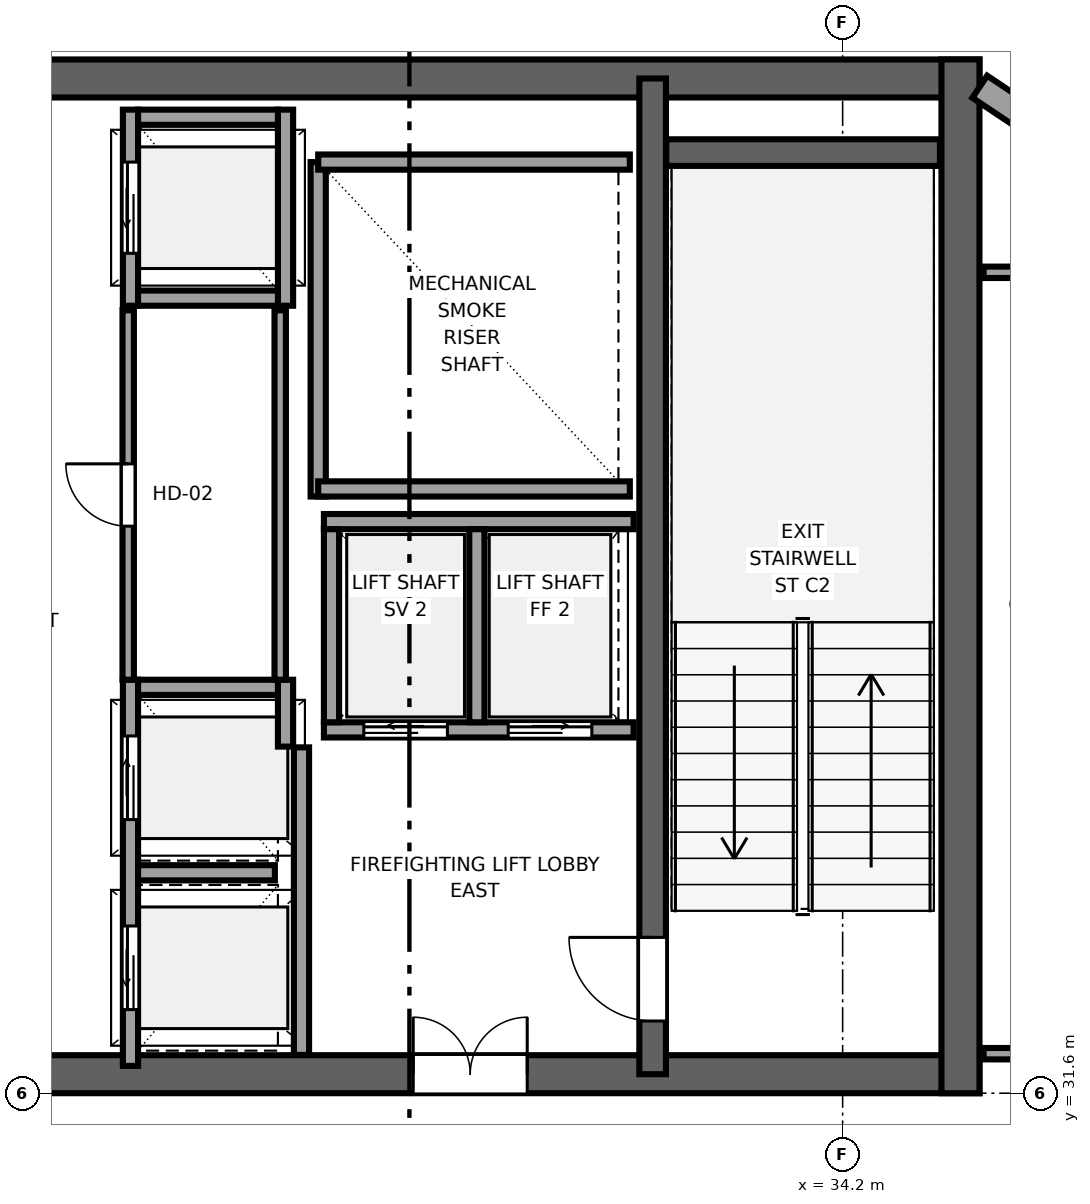
"""IFC4 building model, lengths in metres.
Left out: names, types, materials, properties, quantities, classifications, styles, units other than length and angle.
Written with IfcOpenShell. Run it as: python <this file> out.ifc"""

import sys

from ifc_helpers import new_model, si_unit, direction, frame, frame_2d, origin, place, context, subcontext, project, spatial, rectangle, extrude, source, transform, mapped, element, fill, save


model = new_model("IFC4")
c1 = context("Model", 3, precision=1e-05, world=origin(), true_north=direction((0.0, 1.0)))
c2 = subcontext(c1, "Body", "Model", "MODEL_VIEW")
j1 = project(units=[si_unit("LENGTHUNIT", "METRE"), si_unit("PLANEANGLEUNIT", "RADIAN")], contexts=[c1])
p1 = place(None, origin())
s1 = spatial("IfcSite", under=j1, at=p1, CompositionType="ELEMENT")
p2 = place(p1, origin())
s2 = spatial("IfcBuilding", under=s1, at=p2, CompositionType="ELEMENT")
p3 = place(p2, frame((0.0, 0.0, 282.15)))
s3 = spatial("IfcBuildingStorey", under=s2, at=p3, CompositionType="ELEMENT", Elevation=282.15)
p4 = place(p3, frame((10.0, 31.85, 0.0), z_axis=(0.0, 0.0, 1.0), x_axis=(1.0, 0.0, 0.0)))
e1 = element("IfcWall", 1, at=p4, inside=s3, PredefinedType="SHEAR", context=c2, shape_type="SweptSolid", body=[
    extrude(rectangle(XDim=26.0, YDim=0.5, at=frame_2d((13.0, 0.0))), origin(), (0.0, 0.0, 1.0), 4.4),
])
p5 = place(p4, frame((7.45, 0.0, 0.0), z_axis=(0.0, 0.0, 1.0), x_axis=(-1.0, 0.0, 0.0)))
e2 = element("IfcOpeningElement", 2, at=p5, cuts=e1, PredefinedType="OPENING", context=c2, shape_type="SweptSolid", body=[
    extrude(rectangle(XDim=1.5, YDim=2.04, at=frame_2d((0.75, 1.02))), frame((0.0, 0.26, 0.0), z_axis=(0.0, -1.0, 0.0), x_axis=(1.0, 0.0, 0.0)), (0.0, 0.0, 1.0), 0.52),
])
p6 = place(p4, frame((13.75, 0.0, 0.0), z_axis=(0.0, 0.0, 1.0), x_axis=(-1.0, 0.0, 0.0)))
e3 = element("IfcOpeningElement", 3, at=p6, cuts=e1, PredefinedType="OPENING", context=c2, shape_type="SweptSolid", body=[
    extrude(rectangle(XDim=1.5, YDim=2.04, at=frame_2d((0.75, 1.02))), frame((0.0, 0.26, 0.0), z_axis=(0.0, -1.0, 0.0), x_axis=(1.0, 0.0, 0.0)), (0.0, 0.0, 1.0), 0.52),
])
p7 = place(p4, frame((20.05, 0.0, 0.0), z_axis=(0.0, 0.0, 1.0), x_axis=(-1.0, 0.0, 0.0)))
e4 = element("IfcOpeningElement", 4, at=p7, cuts=e1, PredefinedType="OPENING", context=c2, shape_type="SweptSolid", body=[
    extrude(rectangle(XDim=1.5, YDim=2.04, at=frame_2d((0.75, 1.02))), frame((0.0, 0.26, 0.0), z_axis=(0.0, -1.0, 0.0), x_axis=(1.0, 0.0, 0.0)), (0.0, 0.0, 1.0), 0.52),
])
p8 = place(p3, frame((10.0, 44.95, 0.0), z_axis=(0.0, 0.0, 1.0), x_axis=(1.0, 0.0, 0.0)))
e5 = element("IfcWall", 5, at=p8, inside=s3, PredefinedType="SHEAR", context=c2, shape_type="SweptSolid", body=[
    extrude(rectangle(XDim=26.0, YDim=0.5, at=frame_2d((13.0, 0.0))), origin(), (0.0, 0.0, 1.0), 4.4),
])
p9 = place(p3, frame((35.75, 31.6, 0.0), z_axis=(0.0, 0.0, 1.0), x_axis=(0.0, 1.0, 0.0)))
e6 = element("IfcWall", 6, at=p9, inside=s3, PredefinedType="SHEAR", context=c2, shape_type="SweptSolid", body=[
    extrude(rectangle(XDim=13.6, YDim=0.5, at=frame_2d((6.8, 0.0))), origin(), (0.0, 0.0, 1.0), 4.4),
])
p10 = place(p3, frame((31.7, 31.85, 0.0), z_axis=(0.0, 0.0, 1.0), x_axis=(0.0, 1.0, 0.0)))
e7 = element("IfcWall", 7, at=p10, inside=s3, PredefinedType="SHEAR", context=c2, shape_type="SweptSolid", body=[
    extrude(rectangle(XDim=13.1, YDim=0.35, at=frame_2d((6.55, 0.0))), origin(), (0.0, 0.0, 1.0), 4.4),
])
p11 = place(p10, frame((1.8, 0.0, 0.0), z_axis=(0.0, 0.0, 1.0), x_axis=(-1.0, 0.0, 0.0)))
e8 = element("IfcOpeningElement", 8, at=p11, cuts=e7, PredefinedType="OPENING", context=c2, shape_type="SweptSolid", body=[
    extrude(rectangle(XDim=1.1, YDim=2.12, at=frame_2d((0.55, 1.06))), frame((0.0, 0.185, 0.0), z_axis=(0.0, -1.0, 0.0), x_axis=(1.0, 0.0, 0.0)), (0.0, 0.0, 1.0), 0.37),
])
p12 = place(p3, frame((31.88, 43.975, 0.0), z_axis=(0.0, 0.0, 1.0), x_axis=(1.0, 0.0, 0.0)))
e9 = element("IfcWall", 9, at=p12, inside=s3, PredefinedType="SHEAR", context=c2, shape_type="SweptSolid", body=[
    extrude(rectangle(XDim=3.6, YDim=0.35, at=frame_2d((1.8, 0.0))), origin(), (0.0, 0.0, 1.0), 4.4),
])
p13 = place(p3, frame((37.585, 43.785, 0.0), z_axis=(0.0, 0.0, 1.0), x_axis=(-0.831516639465, 0.555499845448, 0.0)))
e10 = element("IfcWall", 10, at=p13, inside=s3, PredefinedType="SOLIDWALL", context=c2, shape_type="SweptSolid", body=[
    extrude(rectangle(XDim=1.902, YDim=0.35, at=frame_2d((0.951, 0.0))), origin(), (0.0, 0.0, 1.0), 4.18),
])
p14 = place(p3, frame((27.3, 39.45, 0.0), z_axis=(0.0, 0.0, 1.0), x_axis=(0.0, 1.0, 0.0)))
e11 = element("IfcWall", 11, at=p14, inside=s3, PredefinedType="SOLIDWALL", context=c2, shape_type="SweptSolid", body=[
    extrude(rectangle(XDim=4.4, YDim=0.2, at=frame_2d((2.2, 0.0))), origin(), (0.0, 0.0, 1.0), 4.18),
])
for number, where, z_axis, x_axis in (
    (12, (27.3, 39.55, 0.0), (0.0, 0.0, 1.0), (1.0, 0.0, 0.0)),
    (13, (27.3, 43.85, 0.0), (0.0, 0.0, 1.0), (1.0, 0.0, 0.0)),
):
    element("IfcWall", number, at=place(p3, frame(where, z_axis=z_axis, x_axis=x_axis)), inside=s3, PredefinedType="SOLIDWALL", context=c2, shape_type="SweptSolid", body=[
        extrude(rectangle(XDim=4.1, YDim=0.2, at=frame_2d((2.05, 0.0))), origin(), (0.0, 0.0, 1.0), 4.18),
    ])
p15 = place(p3, frame((27.08, 32.104, 0.0), z_axis=(0.0, 0.0, 1.0), x_axis=(0.0, 1.0, 0.0)))
e14 = element("IfcWall", 14, at=p15, inside=s3, PredefinedType="SOLIDWALL", context=c2, shape_type="SweptSolid", body=[
    extrude(rectangle(XDim=4.046, YDim=0.2, at=frame_2d((2.023, 0.0))), origin(), (0.0, 0.0, 1.0), 4.18),
])
p16 = place(p3, frame((27.375, 36.38, 0.0), z_axis=(0.0, 0.0, 1.0), x_axis=(1.0, 0.0, 0.0)))
e15 = element("IfcWall", 15, at=p16, inside=s3, PredefinedType="SOLIDWALL", context=c2, shape_type="SweptSolid", body=[
    extrude(rectangle(XDim=4.075, YDim=0.2, at=frame_2d((2.038, 0.0))), origin(), (0.0, 0.0, 1.0), 4.18),
])
p17 = place(p16, frame((0.525, 0.0, 0.0)))
e16 = element("IfcOpeningElement", 16, at=p17, cuts=e15, PredefinedType="OPENING", context=c2, shape_type="SweptSolid", body=[
    extrude(rectangle(XDim=1.1, YDim=2.12, at=frame_2d((0.55, 1.06))), frame((0.0, 0.11, 0.0), z_axis=(0.0, -1.0, 0.0), x_axis=(1.0, 0.0, 0.0)), (0.0, 0.0, 1.0), 0.22),
])
p18 = place(p16, frame((2.425, 0.0, 0.0)))
e17 = element("IfcOpeningElement", 17, at=p18, cuts=e15, PredefinedType="OPENING", context=c2, shape_type="SweptSolid", body=[
    extrude(rectangle(XDim=1.1, YDim=2.12, at=frame_2d((0.55, 1.06))), frame((0.0, 0.11, 0.0), z_axis=(0.0, -1.0, 0.0), x_axis=(1.0, 0.0, 0.0)), (0.0, 0.0, 1.0), 0.22),
])
p19 = place(p3, frame((27.375, 39.12, 0.0), z_axis=(0.0, 0.0, 1.0), x_axis=(1.0, 0.0, 0.0)))
e18 = element("IfcWall", 18, at=p19, inside=s3, PredefinedType="SOLIDWALL", context=c2, shape_type="SweptSolid", body=[
    extrude(rectangle(XDim=4.075, YDim=0.2, at=frame_2d((2.038, 0.0))), origin(), (0.0, 0.0, 1.0), 4.18),
])
for number, where, z_axis, x_axis in (
    (19, (27.475, 36.48, 0.0), (0.0, 0.0, 1.0), (0.0, 1.0, 0.0)),
    (20, (29.387, 36.48, 0.0), (0.0, 0.0, 1.0), (0.0, 1.0, 0.0)),
):
    element("IfcWall", number, at=place(p3, frame(where, z_axis=z_axis, x_axis=x_axis)), inside=s3, PredefinedType="SOLIDWALL", context=c2, shape_type="SweptSolid", body=[
        extrude(rectangle(XDim=2.54, YDim=0.2, at=frame_2d((1.27, 0.0))), origin(), (0.0, 0.0, 1.0), 4.18),
    ])
p20 = place(p3, frame((24.83, 31.96, 0.0), z_axis=(0.0, 0.0, 1.0), x_axis=(0.0, 1.0, 0.0)))
e21 = element("IfcWall", 21, at=p20, inside=s3, PredefinedType="SOLIDWALL", context=c2, shape_type="SweptSolid", body=[
    extrude(rectangle(XDim=5.08, YDim=0.2, at=frame_2d((2.54, 0.0))), origin(), (0.0, 0.0, 1.0), 4.18),
])
p21 = place(p20, frame((0.74, 0.0, 0.0)))
e22 = element("IfcOpeningElement", 22, at=p21, cuts=e21, PredefinedType="OPENING", context=c2, shape_type="SweptSolid", body=[
    extrude(rectangle(XDim=1.1, YDim=2.12, at=frame_2d((0.55, 1.06))), frame((0.0, 0.11, 0.0), z_axis=(0.0, -1.0, 0.0), x_axis=(1.0, 0.0, 0.0)), (0.0, 0.0, 1.0), 0.22),
])
p22 = place(p20, frame((3.24, 0.0, 0.0)))
e23 = element("IfcOpeningElement", 23, at=p22, cuts=e21, PredefinedType="OPENING", context=c2, shape_type="SweptSolid", body=[
    extrude(rectangle(XDim=1.1, YDim=2.12, at=frame_2d((0.55, 1.06))), frame((0.0, 0.11, 0.0), z_axis=(0.0, -1.0, 0.0), x_axis=(1.0, 0.0, 0.0)), (0.0, 0.0, 1.0), 0.22),
])
p23 = place(p3, frame((26.87, 36.16, 0.0), z_axis=(0.0, 0.0, 1.0), x_axis=(0.0, 1.0, 0.0)))
e24 = element("IfcWall", 24, at=p23, inside=s3, PredefinedType="SOLIDWALL", context=c2, shape_type="SweptSolid", body=[
    extrude(rectangle(XDim=0.88, YDim=0.2, at=frame_2d((0.44, 0.0))), origin(), (0.0, 0.0, 1.0), 4.18),
])
p24 = place(p3, frame((24.93, 36.94, 0.0), z_axis=(0.0, 0.0, 1.0), x_axis=(1.0, 0.0, 0.0)))
e25 = element("IfcWall", 25, at=p24, inside=s3, PredefinedType="SOLIDWALL", context=c2, shape_type="SweptSolid", body=[
    extrude(rectangle(XDim=1.84, YDim=0.2, at=frame_2d((0.92, 0.0))), origin(), (0.0, 0.0, 1.0), 4.18),
])
p25 = place(p3, frame((24.93, 34.5, 0.0), z_axis=(0.0, 0.0, 1.0), x_axis=(1.0, 0.0, 0.0)))
e26 = element("IfcWall", 26, at=p25, inside=s3, PredefinedType="SOLIDWALL", context=c2, shape_type="SweptSolid", body=[
    extrude(rectangle(XDim=1.8, YDim=0.2, at=frame_2d((0.9, 0.0))), origin(), (0.0, 0.0, 1.0), 4.18),
])
p26 = place(p3, frame((24.83, 41.96, 0.0), z_axis=(0.0, 0.0, 1.0), x_axis=(0.0, 1.0, 0.0)))
e27 = element("IfcWall", 27, at=p26, inside=s3, PredefinedType="SOLIDWALL", context=c2, shape_type="SweptSolid", body=[
    extrude(rectangle(XDim=2.58, YDim=0.2, at=frame_2d((1.29, 0.0))), origin(), (0.0, 0.0, 1.0), 4.18),
])
p27 = place(p26, frame((0.69, 0.0, 0.0)))
e28 = element("IfcOpeningElement", 28, at=p27, cuts=e27, PredefinedType="OPENING", context=c2, shape_type="SweptSolid", body=[
    extrude(rectangle(XDim=1.2, YDim=2.15, at=frame_2d((0.6, 1.075))), frame((0.0, 0.11, 0.0), z_axis=(0.0, -1.0, 0.0), x_axis=(1.0, 0.0, 0.0)), (0.0, 0.0, 1.0), 0.22),
])
p28 = place(p3, frame((26.87, 41.96, 0.0), z_axis=(0.0, 0.0, 1.0), x_axis=(0.0, 1.0, 0.0)))
e29 = element("IfcWall", 29, at=p28, inside=s3, PredefinedType="SOLIDWALL", context=c2, shape_type="SweptSolid", body=[
    extrude(rectangle(XDim=2.58, YDim=0.2, at=frame_2d((1.29, 0.0))), origin(), (0.0, 0.0, 1.0), 4.18),
])
for number, where, z_axis, x_axis in (
    (30, (24.93, 42.06, 0.0), (0.0, 0.0, 1.0), (1.0, 0.0, 0.0)),
    (31, (24.93, 44.44, 0.0), (0.0, 0.0, 1.0), (1.0, 0.0, 0.0)),
):
    element("IfcWall", number, at=place(p3, frame(where, z_axis=z_axis, x_axis=x_axis)), inside=s3, PredefinedType="SOLIDWALL", context=c2, shape_type="SweptSolid", body=[
        extrude(rectangle(XDim=1.84, YDim=0.2, at=frame_2d((0.92, 0.0))), origin(), (0.0, 0.0, 1.0), 4.18),
    ])
p29 = place(p3, frame((24.8, 37.04, 0.0), z_axis=(0.0, 0.0, 1.0), x_axis=(0.0, 1.0, 0.0)))
e32 = element("IfcWall", 32, at=p29, inside=s3, PredefinedType="PARTITIONING", context=c2, shape_type="SweptSolid", body=[
    extrude(rectangle(XDim=4.86, YDim=0.15, at=frame_2d((2.43, 0.0))), origin(), (0.0, 0.0, 1.0), 4.18),
])
p30 = place(p29, frame((2.02, 0.0, 0.0)))
e33 = element("IfcOpeningElement", 33, at=p30, cuts=e32, PredefinedType="OPENING", context=c2, shape_type="SweptSolid", body=[
    extrude(rectangle(XDim=0.82, YDim=2.01, at=frame_2d((0.41, 1.005))), frame((0.0, 0.085, 0.0), z_axis=(0.0, -1.0, 0.0), x_axis=(1.0, 0.0, 0.0)), (0.0, 0.0, 1.0), 0.17),
])
p31 = place(p3, frame((26.8, 37.04, 0.0), z_axis=(0.0, 0.0, 1.0), x_axis=(0.0, 1.0, 0.0)))
e34 = element("IfcWall", 34, at=p31, inside=s3, PredefinedType="PARTITIONING", context=c2, shape_type="SweptSolid", body=[
    extrude(rectangle(XDim=4.86, YDim=0.15, at=frame_2d((2.43, 0.0))), origin(), (0.0, 0.0, 1.0), 4.18),
])
p32 = place(p3, frame((36.055, 32.12, 0.0), z_axis=(0.0, 0.0, 1.0), x_axis=(1.0, 0.0, 0.0)))
e35 = element("IfcWall", 35, at=p32, inside=s3, PredefinedType="PARTITIONING", context=c2, shape_type="SweptSolid", body=[
    extrude(rectangle(XDim=2.54, YDim=0.15, at=frame_2d((1.27, 0.0))), origin(), (0.0, 0.0, 1.0), 4.18),
])
p33 = place(p32, frame((0.76, 0.0, 0.0)))
e36 = element("IfcOpeningElement", 36, at=p33, cuts=e35, PredefinedType="OPENING", context=c2, shape_type="SweptSolid", body=[
    extrude(rectangle(XDim=1.02, YDim=2.03, at=frame_2d((0.51, 1.015))), frame((0.0, 0.085, 0.0), z_axis=(0.0, -1.0, 0.0), x_axis=(1.0, 0.0, 0.0)), (0.0, 0.0, 1.0), 0.17),
])
p34 = place(p3, frame((36.055, 42.4, 0.0), z_axis=(0.0, 0.0, 1.0), x_axis=(1.0, 0.0, 0.0)))
e37 = element("IfcWall", 37, at=p34, inside=s3, PredefinedType="PARTITIONING", context=c2, shape_type="SweptSolid", body=[
    extrude(rectangle(XDim=2.179, YDim=0.15, at=frame_2d((1.089, 0.0))), origin(), (0.0, 0.0, 1.0), 4.18),
])
m1 = source(origin(), c2, "Body", "SweptSolid", [
    extrude(rectangle(XDim=1.1, YDim=2.12, at=frame_2d((0.55, 1.06))), frame((0.0, 0.025, 0.0), z_axis=(0.0, -1.0, 0.0), x_axis=(1.0, 0.0, 0.0)), (0.0, 0.0, 1.0), 0.05),
])
p35 = place(p11, origin())
e38 = element("IfcDoor", 38, at=p35, inside=s3, OperationType="SINGLE_SWING_RIGHT", PredefinedType="DOOR", context=c2, shape_type="MappedRepresentation", body=[
    mapped(m1, transform((0.0, 0.0, 0.0), x_axis=(1.0, 0.0, 0.0), y_axis=(0.0, 1.0, 0.0), z_axis=(0.0, 0.0, 1.0), scale=1.0)),
])
fill(e8, e38)
m2 = source(origin(), c2, "Body", "SweptSolid", [
    extrude(rectangle(XDim=1.5, YDim=2.04, at=frame_2d((0.75, 1.02))), frame((0.0, 0.025, 0.0), z_axis=(0.0, -1.0, 0.0), x_axis=(1.0, 0.0, 0.0)), (0.0, 0.0, 1.0), 0.05),
])
p36 = place(p7, origin())
e39 = element("IfcDoor", 39, at=p36, inside=s3, OperationType="DOUBLE_DOOR_SINGLE_SWING", PredefinedType="DOOR", context=c2, shape_type="MappedRepresentation", body=[
    mapped(m2, transform((0.0, 0.0, 0.0), x_axis=(1.0, 0.0, 0.0), y_axis=(0.0, 1.0, 0.0), z_axis=(0.0, 0.0, 1.0), scale=1.0)),
])
fill(e4, e39)
m3 = source(origin(), c2, "Body", "SweptSolid", [
    extrude(rectangle(XDim=1.1, YDim=2.12, at=frame_2d((0.55, 1.06))), frame((0.0, 0.025, 0.0), z_axis=(0.0, -1.0, 0.0), x_axis=(1.0, 0.0, 0.0)), (0.0, 0.0, 1.0), 0.05),
])
p37 = place(p17, origin())
e40 = element("IfcDoor", 40, at=p37, inside=s3, OperationType="SLIDING_TO_LEFT", PredefinedType="DOOR", context=c2, shape_type="MappedRepresentation", body=[
    mapped(m3, transform((0.0, 0.0, 0.0), x_axis=(1.0, 0.0, 0.0), y_axis=(0.0, 1.0, 0.0), z_axis=(0.0, 0.0, 1.0), scale=1.0)),
])
fill(e16, e40)
p38 = place(p18, origin())
e41 = element("IfcDoor", 41, at=p38, inside=s3, OperationType="SLIDING_TO_RIGHT", PredefinedType="DOOR", context=c2, shape_type="MappedRepresentation", body=[
    mapped(m3, transform((0.0, 0.0, 0.0), x_axis=(1.0, 0.0, 0.0), y_axis=(0.0, 1.0, 0.0), z_axis=(0.0, 0.0, 1.0), scale=1.0)),
])
fill(e17, e41)
p39 = place(p21, origin())
e42 = element("IfcDoor", 42, at=p39, inside=s3, OperationType="SLIDING_TO_LEFT", PredefinedType="DOOR", context=c2, shape_type="MappedRepresentation", body=[
    mapped(m3, transform((0.0, 0.0, 0.0), x_axis=(1.0, 0.0, 0.0), y_axis=(0.0, 1.0, 0.0), z_axis=(0.0, 0.0, 1.0), scale=1.0)),
])
fill(e22, e42)
p40 = place(p22, origin())
e43 = element("IfcDoor", 43, at=p40, inside=s3, OperationType="SLIDING_TO_RIGHT", PredefinedType="DOOR", context=c2, shape_type="MappedRepresentation", body=[
    mapped(m3, transform((0.0, 0.0, 0.0), x_axis=(1.0, 0.0, 0.0), y_axis=(0.0, 1.0, 0.0), z_axis=(0.0, 0.0, 1.0), scale=1.0)),
])
fill(e23, e43)
m4 = source(origin(), c2, "Body", "SweptSolid", [
    extrude(rectangle(XDim=1.2, YDim=2.15, at=frame_2d((0.6, 1.075))), frame((0.0, 0.025, 0.0), z_axis=(0.0, -1.0, 0.0), x_axis=(1.0, 0.0, 0.0)), (0.0, 0.0, 1.0), 0.05),
])
p41 = place(p27, origin())
e44 = element("IfcDoor", 44, at=p41, inside=s3, OperationType="SLIDING_TO_LEFT", PredefinedType="DOOR", context=c2, shape_type="MappedRepresentation", body=[
    mapped(m4, transform((0.0, 0.0, 0.0), x_axis=(1.0, 0.0, 0.0), y_axis=(0.0, 1.0, 0.0), z_axis=(0.0, 0.0, 1.0), scale=1.0)),
])
fill(e28, e44)
m5 = source(origin(), c2, "Body", "SweptSolid", [
    extrude(rectangle(XDim=0.82, YDim=2.01, at=frame_2d((0.41, 1.005))), frame((0.0, 0.025, 0.0), z_axis=(0.0, -1.0, 0.0), x_axis=(1.0, 0.0, 0.0)), (0.0, 0.0, 1.0), 0.05),
])
p42 = place(p30, origin())
e45 = element("IfcDoor", 45, at=p42, inside=s3, OperationType="SINGLE_SWING_RIGHT", PredefinedType="DOOR", context=c2, shape_type="MappedRepresentation", body=[
    mapped(m5, transform((0.0, 0.0, 0.0), x_axis=(1.0, 0.0, 0.0), y_axis=(0.0, 1.0, 0.0), z_axis=(0.0, 0.0, 1.0), scale=1.0)),
])
fill(e33, e45)
save(model, sys.argv[1])
